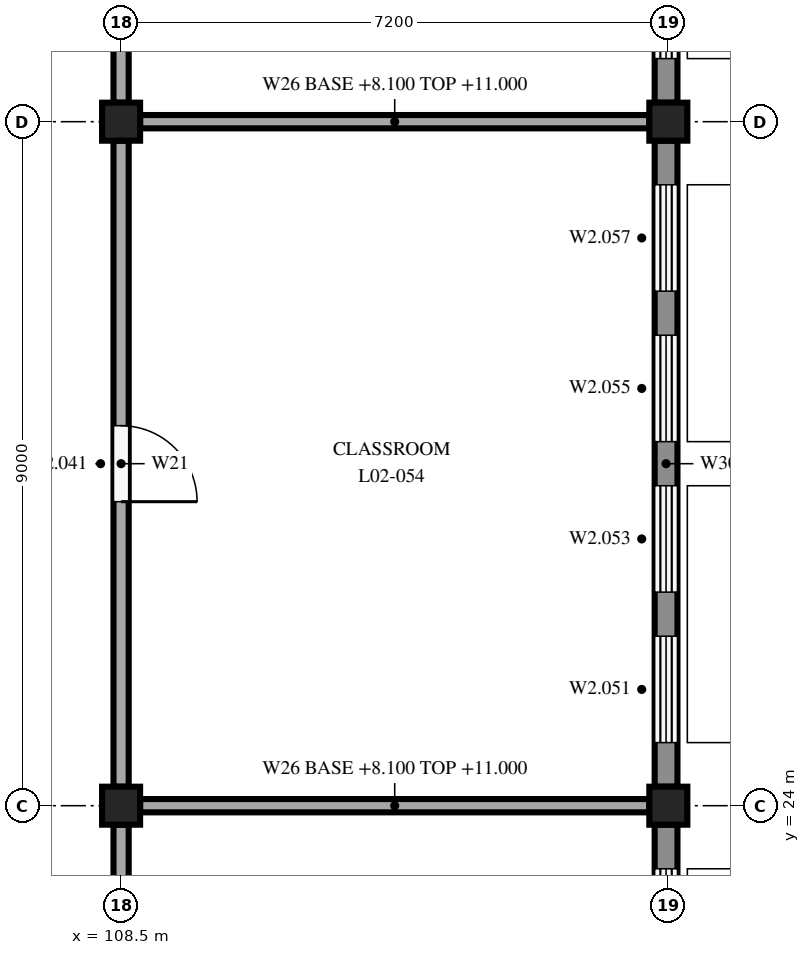
"""IFC4 building model, lengths in metres.
Left out: names, types, materials, properties, quantities, classifications, styles, units other than length and angle.
Written with IfcOpenShell. Run it as: python <this file> out.ifc"""

import sys

from ifc_helpers import new_model, si_unit, direction, frame, frame_2d, origin, origin_2d, place, context, subcontext, project, spatial, rectangle, extrude, element, fill, save


model = new_model("IFC4")
c1 = context("Model", 3, precision=1e-05, world=origin(), true_north=direction((0.0, 1.0)))
c2 = subcontext(c1, "Body", "Model", "MODEL_VIEW")
j1 = project(units=[si_unit("LENGTHUNIT", "METRE"), si_unit("PLANEANGLEUNIT", "RADIAN")], contexts=[c1])
p1 = place(None, origin())
s1 = spatial("IfcSite", under=j1, at=p1, CompositionType="ELEMENT")
p2 = place(p1, origin())
s2 = spatial("IfcBuilding", under=s1, at=p2, CompositionType="ELEMENT")
p3 = place(p2, frame((0.0, 0.0, 8.1)))
s3 = spatial("IfcBuildingStorey", under=s2, at=p3, CompositionType="ELEMENT", Elevation=8.1)
for number, where, z_axis, x_axis in (
    (1, (108.5, 24.0, 0.0), (0.0, 0.0, 1.0), (1.0, 0.0, 0.0)),
    (2, (108.5, 33.0, 0.0), (0.0, 0.0, 1.0), (1.0, 0.0, 0.0)),
    (3, (115.7, 24.0, 0.0), (0.0, 0.0, 1.0), (1.0, 0.0, 0.0)),
    (4, (115.7, 33.0, 0.0), (0.0, 0.0, 1.0), (1.0, 0.0, 0.0)),
):
    element("IfcColumn", number, at=place(p3, frame(where, z_axis=z_axis, x_axis=x_axis)), inside=s3, PredefinedType="COLUMN", context=c2, shape_type="SweptSolid", body=[
        extrude(rectangle(XDim=0.5, YDim=0.5, at=origin_2d()), origin(), (0.0, 0.0, 1.0), 3.35),
    ])
p4 = place(p3, frame((115.67, 23.75, 0.0), z_axis=(0.0, 0.0, 1.0), x_axis=(0.0, -1.0, 0.0)))
e5 = element("IfcWall", 5, at=p4, inside=s3, PredefinedType="STANDARD", context=c2, shape_type="SweptSolid", body=[
    extrude(rectangle(XDim=8.5, YDim=0.3, at=frame_2d((4.25, 0.0))), origin(), (0.0, 0.0, 1.0), 2.85),
])
p5 = place(p4, frame((6.52, 0.0, 0.6)))
e6 = element("IfcOpeningElement", 6, at=p5, cuts=e5, PredefinedType="OPENING", context=c2, shape_type="SweptSolid", body=[
    extrude(rectangle(XDim=1.4, YDim=2.2, at=frame_2d((0.7, 1.1))), frame((0.0, 0.16, 0.0), z_axis=(0.0, -1.0, 0.0), x_axis=(1.0, 0.0, 0.0)), (0.0, 0.0, 1.0), 0.32),
])
p6 = place(p4, frame((4.54, 0.0, 0.6)))
e7 = element("IfcOpeningElement", 7, at=p6, cuts=e5, PredefinedType="OPENING", context=c2, shape_type="SweptSolid", body=[
    extrude(rectangle(XDim=1.4, YDim=2.2, at=frame_2d((0.7, 1.1))), frame((0.0, 0.16, 0.0), z_axis=(0.0, -1.0, 0.0), x_axis=(1.0, 0.0, 0.0)), (0.0, 0.0, 1.0), 0.32),
])
p7 = place(p4, frame((2.56, 0.0, 0.6)))
e8 = element("IfcOpeningElement", 8, at=p7, cuts=e5, PredefinedType="OPENING", context=c2, shape_type="SweptSolid", body=[
    extrude(rectangle(XDim=1.4, YDim=2.2, at=frame_2d((0.7, 1.1))), frame((0.0, 0.16, 0.0), z_axis=(0.0, -1.0, 0.0), x_axis=(1.0, 0.0, 0.0)), (0.0, 0.0, 1.0), 0.32),
])
p8 = place(p4, frame((0.58, 0.0, 0.6)))
e9 = element("IfcOpeningElement", 9, at=p8, cuts=e5, PredefinedType="OPENING", context=c2, shape_type="SweptSolid", body=[
    extrude(rectangle(XDim=1.4, YDim=2.2, at=frame_2d((0.7, 1.1))), frame((0.0, 0.16, 0.0), z_axis=(0.0, -1.0, 0.0), x_axis=(1.0, 0.0, 0.0)), (0.0, 0.0, 1.0), 0.32),
])
p9 = place(p3, frame((115.67, 32.75, 0.0), z_axis=(0.0, 0.0, 1.0), x_axis=(0.0, -1.0, 0.0)))
e10 = element("IfcWall", 10, at=p9, inside=s3, PredefinedType="STANDARD", context=c2, shape_type="SweptSolid", body=[
    extrude(rectangle(XDim=8.5, YDim=0.3, at=frame_2d((4.25, 0.0))), origin(), (0.0, 0.0, 1.0), 2.85),
])
p10 = place(p9, frame((6.52, 0.0, 0.6)))
e11 = element("IfcOpeningElement", 11, at=p10, cuts=e10, PredefinedType="OPENING", context=c2, shape_type="SweptSolid", body=[
    extrude(rectangle(XDim=1.4, YDim=2.2, at=frame_2d((0.7, 1.1))), frame((0.0, 0.16, 0.0), z_axis=(0.0, -1.0, 0.0), x_axis=(1.0, 0.0, 0.0)), (0.0, 0.0, 1.0), 0.32),
])
p11 = place(p9, frame((4.54, 0.0, 0.6)))
e12 = element("IfcOpeningElement", 12, at=p11, cuts=e10, PredefinedType="OPENING", context=c2, shape_type="SweptSolid", body=[
    extrude(rectangle(XDim=1.4, YDim=2.2, at=frame_2d((0.7, 1.1))), frame((0.0, 0.16, 0.0), z_axis=(0.0, -1.0, 0.0), x_axis=(1.0, 0.0, 0.0)), (0.0, 0.0, 1.0), 0.32),
])
p12 = place(p9, frame((2.56, 0.0, 0.6)))
e13 = element("IfcOpeningElement", 13, at=p12, cuts=e10, PredefinedType="OPENING", context=c2, shape_type="SweptSolid", body=[
    extrude(rectangle(XDim=1.4, YDim=2.2, at=frame_2d((0.7, 1.1))), frame((0.0, 0.16, 0.0), z_axis=(0.0, -1.0, 0.0), x_axis=(1.0, 0.0, 0.0)), (0.0, 0.0, 1.0), 0.32),
])
p13 = place(p9, frame((0.58, 0.0, 0.6)))
e14 = element("IfcOpeningElement", 14, at=p13, cuts=e10, PredefinedType="OPENING", context=c2, shape_type="SweptSolid", body=[
    extrude(rectangle(XDim=1.4, YDim=2.2, at=frame_2d((0.7, 1.1))), frame((0.0, 0.16, 0.0), z_axis=(0.0, -1.0, 0.0), x_axis=(1.0, 0.0, 0.0)), (0.0, 0.0, 1.0), 0.32),
])
p14 = place(p3, frame((115.67, 41.75, 0.0), z_axis=(0.0, 0.0, 1.0), x_axis=(0.0, -1.0, 0.0)))
e15 = element("IfcWall", 15, at=p14, inside=s3, PredefinedType="STANDARD", context=c2, shape_type="SweptSolid", body=[
    extrude(rectangle(XDim=8.5, YDim=0.3, at=frame_2d((4.25, 0.0))), origin(), (0.0, 0.0, 1.0), 2.85),
])
p15 = place(p14, frame((6.52, 0.0, 0.6)))
e16 = element("IfcOpeningElement", 16, at=p15, cuts=e15, PredefinedType="OPENING", context=c2, shape_type="SweptSolid", body=[
    extrude(rectangle(XDim=1.4, YDim=2.2, at=frame_2d((0.7, 1.1))), frame((0.0, 0.16, 0.0), z_axis=(0.0, -1.0, 0.0), x_axis=(1.0, 0.0, 0.0)), (0.0, 0.0, 1.0), 0.32),
])
p16 = place(p14, frame((4.54, 0.0, 0.6)))
e17 = element("IfcOpeningElement", 17, at=p16, cuts=e15, PredefinedType="OPENING", context=c2, shape_type="SweptSolid", body=[
    extrude(rectangle(XDim=1.4, YDim=2.2, at=frame_2d((0.7, 1.1))), frame((0.0, 0.16, 0.0), z_axis=(0.0, -1.0, 0.0), x_axis=(1.0, 0.0, 0.0)), (0.0, 0.0, 1.0), 0.32),
])
p17 = place(p14, frame((2.56, 0.0, 0.6)))
e18 = element("IfcOpeningElement", 18, at=p17, cuts=e15, PredefinedType="OPENING", context=c2, shape_type="SweptSolid", body=[
    extrude(rectangle(XDim=1.4, YDim=2.2, at=frame_2d((0.7, 1.1))), frame((0.0, 0.16, 0.0), z_axis=(0.0, -1.0, 0.0), x_axis=(1.0, 0.0, 0.0)), (0.0, 0.0, 1.0), 0.32),
])
p18 = place(p14, frame((0.58, 0.0, 0.6)))
e19 = element("IfcOpeningElement", 19, at=p18, cuts=e15, PredefinedType="OPENING", context=c2, shape_type="SweptSolid", body=[
    extrude(rectangle(XDim=1.4, YDim=2.2, at=frame_2d((0.7, 1.1))), frame((0.0, 0.16, 0.0), z_axis=(0.0, -1.0, 0.0), x_axis=(1.0, 0.0, 0.0)), (0.0, 0.0, 1.0), 0.32),
])
p19 = place(p3, frame((108.5, 23.75, 0.0), z_axis=(0.0, 0.0, 1.0), x_axis=(0.0, -1.0, 0.0)))
e20 = element("IfcWall", 20, at=p19, inside=s3, PredefinedType="PARTITIONING", context=c2, shape_type="SweptSolid", body=[
    extrude(rectangle(XDim=8.5, YDim=0.2, at=frame_2d((4.25, 0.0))), origin(), (0.0, 0.0, 1.0), 2.9),
])
p20 = place(p19, frame((3.75, 0.0, 0.0)))
e21 = element("IfcOpeningElement", 21, at=p20, cuts=e20, PredefinedType="OPENING", context=c2, shape_type="SweptSolid", body=[
    extrude(rectangle(XDim=1.0, YDim=2.1, at=frame_2d((0.5, 1.05))), frame((0.0, 0.11, 0.0), z_axis=(0.0, -1.0, 0.0), x_axis=(1.0, 0.0, 0.0)), (0.0, 0.0, 1.0), 0.22),
])
p21 = place(p3, frame((108.5, 32.75, 0.0), z_axis=(0.0, 0.0, 1.0), x_axis=(0.0, -1.0, 0.0)))
e22 = element("IfcWall", 22, at=p21, inside=s3, PredefinedType="PARTITIONING", context=c2, shape_type="SweptSolid", body=[
    extrude(rectangle(XDim=8.5, YDim=0.2, at=frame_2d((4.25, 0.0))), origin(), (0.0, 0.0, 1.0), 2.9),
])
p22 = place(p21, frame((3.75, 0.0, 0.0)))
e23 = element("IfcOpeningElement", 23, at=p22, cuts=e22, PredefinedType="OPENING", context=c2, shape_type="SweptSolid", body=[
    extrude(rectangle(XDim=1.0, YDim=2.1, at=frame_2d((0.5, 1.05))), frame((0.0, 0.11, 0.0), z_axis=(0.0, -1.0, 0.0), x_axis=(1.0, 0.0, 0.0)), (0.0, 0.0, 1.0), 0.22),
])
p23 = place(p3, frame((108.5, 41.75, 0.0), z_axis=(0.0, 0.0, 1.0), x_axis=(0.0, -1.0, 0.0)))
e24 = element("IfcWall", 24, at=p23, inside=s3, PredefinedType="PARTITIONING", context=c2, shape_type="SweptSolid", body=[
    extrude(rectangle(XDim=8.5, YDim=0.2, at=frame_2d((4.25, 0.0))), origin(), (0.0, 0.0, 1.0), 2.9),
])
p24 = place(p23, frame((3.75, 0.0, 0.0)))
e25 = element("IfcOpeningElement", 25, at=p24, cuts=e24, PredefinedType="OPENING", context=c2, shape_type="SweptSolid", body=[
    extrude(rectangle(XDim=1.0, YDim=2.1, at=frame_2d((0.5, 1.05))), frame((0.0, 0.11, 0.0), z_axis=(0.0, -1.0, 0.0), x_axis=(1.0, 0.0, 0.0)), (0.0, 0.0, 1.0), 0.22),
])
for number, where, z_axis, x_axis in (
    (26, (108.75, 24.0, 0.0), (0.0, 0.0, 1.0), (1.0, 0.0, 0.0)),
    (27, (108.75, 33.0, 0.0), (0.0, 0.0, 1.0), (1.0, 0.0, 0.0)),
):
    element("IfcWall", number, at=place(p3, frame(where, z_axis=z_axis, x_axis=x_axis)), inside=s3, PredefinedType="PARTITIONING", context=c2, shape_type="SweptSolid", body=[
        extrude(rectangle(XDim=6.7, YDim=0.175, at=frame_2d((3.35, 0.0))), origin(), (0.0, 0.0, 1.0), 2.9),
    ])
p25 = place(p8, origin())
e28 = element("IfcWindow", 28, at=p25, inside=s3, PartitioningType="DOUBLE_PANEL_VERTICAL", PredefinedType="WINDOW", context=c2, shape_type="SweptSolid", body=[
    extrude(rectangle(XDim=1.4, YDim=2.2, at=frame_2d((0.7, 1.1))), frame((0.0, 0.03, 0.0), z_axis=(0.0, -1.0, 0.0), x_axis=(1.0, 0.0, 0.0)), (0.0, 0.0, 1.0), 0.06),
])
fill(e9, e28)
p26 = place(p10, origin())
e29 = element("IfcWindow", 29, at=p26, inside=s3, PartitioningType="DOUBLE_PANEL_VERTICAL", PredefinedType="WINDOW", context=c2, shape_type="SweptSolid", body=[
    extrude(rectangle(XDim=1.4, YDim=2.2, at=frame_2d((0.7, 1.1))), frame((0.0, 0.03, 0.0), z_axis=(0.0, -1.0, 0.0), x_axis=(1.0, 0.0, 0.0)), (0.0, 0.0, 1.0), 0.06),
])
fill(e11, e29)
p27 = place(p11, origin())
e30 = element("IfcWindow", 30, at=p27, inside=s3, PartitioningType="DOUBLE_PANEL_VERTICAL", PredefinedType="WINDOW", context=c2, shape_type="SweptSolid", body=[
    extrude(rectangle(XDim=1.4, YDim=2.2, at=frame_2d((0.7, 1.1))), frame((0.0, 0.03, 0.0), z_axis=(0.0, -1.0, 0.0), x_axis=(1.0, 0.0, 0.0)), (0.0, 0.0, 1.0), 0.06),
])
fill(e12, e30)
p28 = place(p12, origin())
e31 = element("IfcWindow", 31, at=p28, inside=s3, PartitioningType="DOUBLE_PANEL_VERTICAL", PredefinedType="WINDOW", context=c2, shape_type="SweptSolid", body=[
    extrude(rectangle(XDim=1.4, YDim=2.2, at=frame_2d((0.7, 1.1))), frame((0.0, 0.03, 0.0), z_axis=(0.0, -1.0, 0.0), x_axis=(1.0, 0.0, 0.0)), (0.0, 0.0, 1.0), 0.06),
])
fill(e13, e31)
p29 = place(p13, origin())
e32 = element("IfcWindow", 32, at=p29, inside=s3, PartitioningType="DOUBLE_PANEL_VERTICAL", PredefinedType="WINDOW", context=c2, shape_type="SweptSolid", body=[
    extrude(rectangle(XDim=1.4, YDim=2.2, at=frame_2d((0.7, 1.1))), frame((0.0, 0.03, 0.0), z_axis=(0.0, -1.0, 0.0), x_axis=(1.0, 0.0, 0.0)), (0.0, 0.0, 1.0), 0.06),
])
fill(e14, e32)
p30 = place(p15, origin())
e33 = element("IfcWindow", 33, at=p30, inside=s3, PartitioningType="DOUBLE_PANEL_VERTICAL", PredefinedType="WINDOW", context=c2, shape_type="SweptSolid", body=[
    extrude(rectangle(XDim=1.4, YDim=2.2, at=frame_2d((0.7, 1.1))), frame((0.0, 0.03, 0.0), z_axis=(0.0, -1.0, 0.0), x_axis=(1.0, 0.0, 0.0)), (0.0, 0.0, 1.0), 0.06),
])
fill(e16, e33)
p31 = place(p22, origin())
e34 = element("IfcDoor", 34, at=p31, inside=s3, OperationType="SINGLE_SWING_RIGHT", PredefinedType="DOOR", context=c2, shape_type="SweptSolid", body=[
    extrude(rectangle(XDim=1.0, YDim=2.1, at=frame_2d((0.5, 1.05))), frame((0.0, 0.025, 0.0), z_axis=(0.0, -1.0, 0.0), x_axis=(1.0, 0.0, 0.0)), (0.0, 0.0, 1.0), 0.05),
])
fill(e23, e34)
save(model, sys.argv[1])
